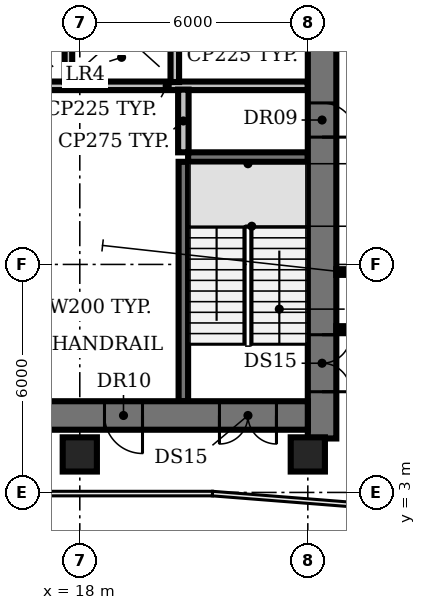
"""IFC4 building model, lengths in metres.
Left out: names, types, materials, properties, quantities, classifications, styles, units other than length and angle.
Written with IfcOpenShell. Run it as: python <this file> out.ifc"""

import sys

from ifc_helpers import new_model, si_unit, direction, frame, frame_2d, origin, origin_2d, place, context, subcontext, project, spatial, rectangle, extrude, element, fill, save


model = new_model("IFC4")
c1 = context("Model", 3, precision=1e-05, world=origin(), true_north=direction((0.0, 1.0)))
c2 = subcontext(c1, "Body", "Model", "MODEL_VIEW")
j1 = project(units=[si_unit("LENGTHUNIT", "METRE"), si_unit("PLANEANGLEUNIT", "RADIAN")], contexts=[c1])
p1 = place(None, origin())
s1 = spatial("IfcSite", under=j1, at=p1, CompositionType="ELEMENT")
p2 = place(p1, origin())
s2 = spatial("IfcBuilding", under=s1, at=p2, CompositionType="ELEMENT")
p3 = place(p2, frame((0.0, 0.0, 129.8)))
s3 = spatial("IfcBuildingStorey", under=s2, at=p3, CompositionType="ELEMENT", Elevation=129.8)
for number, where, z_axis, x_axis in (
    (1, (18.0, 4.0, 0.0), (0.0, 0.0, 1.0), (1.0, 0.0, 0.0)),
    (2, (24.0, 4.0, 0.0), (0.0, 0.0, 1.0), (1.0, 0.0, 0.0)),
):
    element("IfcColumn", number, at=place(p3, frame(where, z_axis=z_axis, x_axis=x_axis)), inside=s3, PredefinedType="COLUMN", context=c2, shape_type="SweptSolid", body=[
        extrude(rectangle(XDim=0.9, YDim=0.9, at=origin_2d()), origin(), (0.0, 0.0, 1.0), 3.85),
    ])
p4 = place(p3, frame((20.85, 11.825, 0.0), z_axis=(0.0, 0.0, 1.0), x_axis=(1.0, 0.0, 0.0)))
e3 = element("IfcWall", 3, at=p4, inside=s3, PredefinedType="SHEAR", context=c2, shape_type="SweptSolid", body=[
    extrude(rectangle(XDim=3.15, YDim=0.25, at=frame_2d((1.575, 0.0))), origin(), (0.0, 0.0, 1.0), 3.85),
])
p5 = place(p3, frame((16.6, 13.7, 0.0), z_axis=(0.0, 0.0, 1.0), x_axis=(1.0, 0.0, 0.0)))
e4 = element("IfcWall", 4, at=p5, inside=s3, PredefinedType="PARTITIONING", context=c2, shape_type="SweptSolid", body=[
    extrude(rectangle(XDim=7.4, YDim=0.225, at=frame_2d((3.7, 0.0))), origin(), (0.0, 0.0, 1.0), 3.85),
])
p6 = place(p3, frame((17.7, 13.8, 0.0), z_axis=(0.0, 0.0, 1.0), x_axis=(0.0, 1.0, 0.0)))
e5 = element("IfcWall", 5, at=p6, inside=s3, PredefinedType="SOLIDWALL", context=c2, shape_type="SweptSolid", body=[
    extrude(rectangle(XDim=2.6, YDim=0.2, at=frame_2d((1.3, 0.0))), origin(), (0.0, 0.0, 1.0), 3.85),
])
p7 = place(p3, frame((20.5, 13.8, 0.0), z_axis=(0.0, 0.0, 1.0), x_axis=(0.0, 1.0, 0.0)))
e6 = element("IfcWall", 6, at=p7, inside=s3, PredefinedType="PARTITIONING", context=c2, shape_type="SweptSolid", body=[
    extrude(rectangle(XDim=2.6, YDim=0.225, at=frame_2d((1.3, 0.0))), origin(), (0.0, 0.0, 1.0), 3.85),
])
p8 = place(p3, frame((20.725, 5.4, 0.0), z_axis=(0.0, 0.0, 1.0), x_axis=(0.0, 1.0, 0.0)))
e7 = element("IfcWall", 7, at=p8, inside=s3, PredefinedType="SHEAR", context=c2, shape_type="SweptSolid", body=[
    extrude(rectangle(XDim=6.3, YDim=0.25, at=frame_2d((3.15, 0.0))), origin(), (0.0, 0.0, 1.0), 3.85),
])
p9 = place(p3, frame((20.725, 11.95, 0.0), z_axis=(0.0, 0.0, 1.0), x_axis=(0.0, 1.0, 0.0)))
e8 = element("IfcWall", 8, at=p9, inside=s3, PredefinedType="PARTITIONING", context=c2, shape_type="SweptSolid", body=[
    extrude(rectangle(XDim=1.65, YDim=0.275, at=frame_2d((0.825, 0.0))), origin(), (0.0, 0.0, 1.0), 3.85),
])
p10 = place(p3, frame((24.375, 25.55, 0.0), z_axis=(0.0, 0.0, 1.0), x_axis=(0.0, -1.0, 0.0)))
e9 = element("IfcWall", 9, at=p10, inside=s3, PredefinedType="SHEAR", context=c2, shape_type="SweptSolid", body=[
    extrude(rectangle(XDim=21.13, YDim=0.75, at=frame_2d((10.565, 0.0))), origin(), (0.0, 0.0, 1.0), 3.85),
])
p11 = place(p10, frame((18.4, 0.0, 0.0)))
e10 = element("IfcOpeningElement", 10, at=p11, cuts=e9, PredefinedType="OPENING", context=c2, shape_type="SweptSolid", body=[
    extrude(rectangle(XDim=1.5, YDim=2.1, at=frame_2d((0.75, 1.05))), frame((0.0, 0.385, 0.0), z_axis=(0.0, -1.0, 0.0), x_axis=(1.0, 0.0, 0.0)), (0.0, 0.0, 1.0), 0.77),
])
p12 = place(p10, frame((12.3, 0.0, 0.0)))
e11 = element("IfcOpeningElement", 11, at=p12, cuts=e9, PredefinedType="OPENING", context=c2, shape_type="SweptSolid", body=[
    extrude(rectangle(XDim=0.9, YDim=2.1, at=frame_2d((0.45, 1.05))), frame((0.0, 0.385, 0.0), z_axis=(0.0, -1.0, 0.0), x_axis=(1.0, 0.0, 0.0)), (0.0, 0.0, 1.0), 0.77),
])
p13 = place(p10, frame((6.3, 0.0, 0.0)))
e12 = element("IfcOpeningElement", 12, at=p13, cuts=e9, PredefinedType="OPENING", context=c2, shape_type="SweptSolid", body=[
    extrude(rectangle(XDim=2.0, YDim=2.1, at=frame_2d((1.0, 1.05))), frame((0.0, 0.385, 0.0), z_axis=(0.0, -1.0, 0.0), x_axis=(1.0, 0.0, 0.0)), (0.0, 0.0, 1.0), 0.77),
])
p14 = place(p3, frame((24.0, 5.025, 0.0), z_axis=(0.0, 0.0, 1.0), x_axis=(-1.0, 0.0, 0.0)))
e13 = element("IfcWall", 13, at=p14, inside=s3, PredefinedType="SHEAR", context=c2, shape_type="SweptSolid", body=[
    extrude(rectangle(XDim=18.0, YDim=0.75, at=frame_2d((9.0, 0.0))), origin(), (0.0, 0.0, 1.0), 3.85),
])
p15 = place(p14, frame((0.825, 0.0, 0.0)))
e14 = element("IfcOpeningElement", 14, at=p15, cuts=e13, PredefinedType="OPENING", context=c2, shape_type="SweptSolid", body=[
    extrude(rectangle(XDim=1.5, YDim=2.1, at=frame_2d((0.75, 1.05))), frame((0.0, 0.385, 0.0), z_axis=(0.0, -1.0, 0.0), x_axis=(1.0, 0.0, 0.0)), (0.0, 0.0, 1.0), 0.77),
])
p16 = place(p14, frame((15.675, 0.0, 0.0)))
e15 = element("IfcOpeningElement", 15, at=p16, cuts=e13, PredefinedType="OPENING", context=c2, shape_type="SweptSolid", body=[
    extrude(rectangle(XDim=1.5, YDim=2.1, at=frame_2d((0.75, 1.05))), frame((0.0, 0.385, 0.0), z_axis=(0.0, -1.0, 0.0), x_axis=(1.0, 0.0, 0.0)), (0.0, 0.0, 1.0), 0.77),
])
p17 = place(p14, frame((13.0, 0.0, 0.0)))
e16 = element("IfcOpeningElement", 16, at=p17, cuts=e13, PredefinedType="OPENING", context=c2, shape_type="SweptSolid", body=[
    extrude(rectangle(XDim=1.2, YDim=2.1, at=frame_2d((0.6, 1.05))), frame((0.0, 0.385, 0.0), z_axis=(0.0, -1.0, 0.0), x_axis=(1.0, 0.0, 0.0)), (0.0, 0.0, 1.0), 0.77),
])
p18 = place(p14, frame((4.35, 0.0, 0.0)))
e17 = element("IfcOpeningElement", 17, at=p18, cuts=e13, PredefinedType="OPENING", context=c2, shape_type="SweptSolid", body=[
    extrude(rectangle(XDim=1.0, YDim=2.1, at=frame_2d((0.5, 1.05))), frame((0.0, 0.385, 0.0), z_axis=(0.0, -1.0, 0.0), x_axis=(1.0, 0.0, 0.0)), (0.0, 0.0, 1.0), 0.77),
])
for number, where, z_axis, x_axis in (
    (18, (24.75, 7.3, 0.0), (0.0, 0.0, 1.0), (1.0, 0.0, 0.0)),
    (19, (24.75, 8.8, 0.0), (0.0, 0.0, 1.0), (1.0, 0.0, 0.0)),
):
    element("IfcWall", number, at=place(p3, frame(where, z_axis=z_axis, x_axis=x_axis)), inside=s3, PredefinedType="PARTITIONING", context=c2, shape_type="SweptSolid", body=[
        extrude(rectangle(XDim=1.05, YDim=0.15, at=frame_2d((0.525, 0.0))), origin(), (0.0, 0.0, 1.0), 2.83),
    ])
p19 = place(p11, origin())
e20 = element("IfcDoor", 20, at=p19, inside=s3, OperationType="DOUBLE_DOOR_SINGLE_SWING", PredefinedType="DOOR", context=c2, shape_type="SweptSolid", body=[
    extrude(rectangle(XDim=1.5, YDim=2.1, at=frame_2d((0.75, 1.05))), frame((0.0, 0.025, 0.0), z_axis=(0.0, -1.0, 0.0), x_axis=(1.0, 0.0, 0.0)), (0.0, 0.0, 1.0), 0.05),
])
fill(e10, e20)
p20 = place(p12, origin())
e21 = element("IfcDoor", 21, at=p20, inside=s3, OperationType="SINGLE_SWING_RIGHT", PredefinedType="DOOR", context=c2, shape_type="SweptSolid", body=[
    extrude(rectangle(XDim=0.9, YDim=2.1, at=frame_2d((0.45, 1.05))), frame((0.0, -0.315, 0.0), z_axis=(0.0, -1.0, 0.0), x_axis=(1.0, 0.0, 0.0)), (0.0, 0.0, 1.0), 0.05),
])
fill(e11, e21)
p21 = place(p15, origin())
e22 = element("IfcDoor", 22, at=p21, inside=s3, OperationType="DOUBLE_DOOR_SINGLE_SWING", PredefinedType="DOOR", context=c2, shape_type="SweptSolid", body=[
    extrude(rectangle(XDim=1.5, YDim=2.1, at=frame_2d((0.75, 1.05))), frame((0.0, 0.025, 0.0), z_axis=(0.0, -1.0, 0.0), x_axis=(1.0, 0.0, 0.0)), (0.0, 0.0, 1.0), 0.05),
])
fill(e14, e22)
p22 = place(p18, origin())
e23 = element("IfcDoor", 23, at=p22, inside=s3, OperationType="SINGLE_SWING_LEFT", PredefinedType="DOOR", context=c2, shape_type="SweptSolid", body=[
    extrude(rectangle(XDim=1.0, YDim=2.1, at=frame_2d((0.5, 1.05))), frame((0.0, -0.315, 0.0), z_axis=(0.0, -1.0, 0.0), x_axis=(1.0, 0.0, 0.0)), (0.0, 0.0, 1.0), 0.05),
])
fill(e17, e23)
save(model, sys.argv[1])
